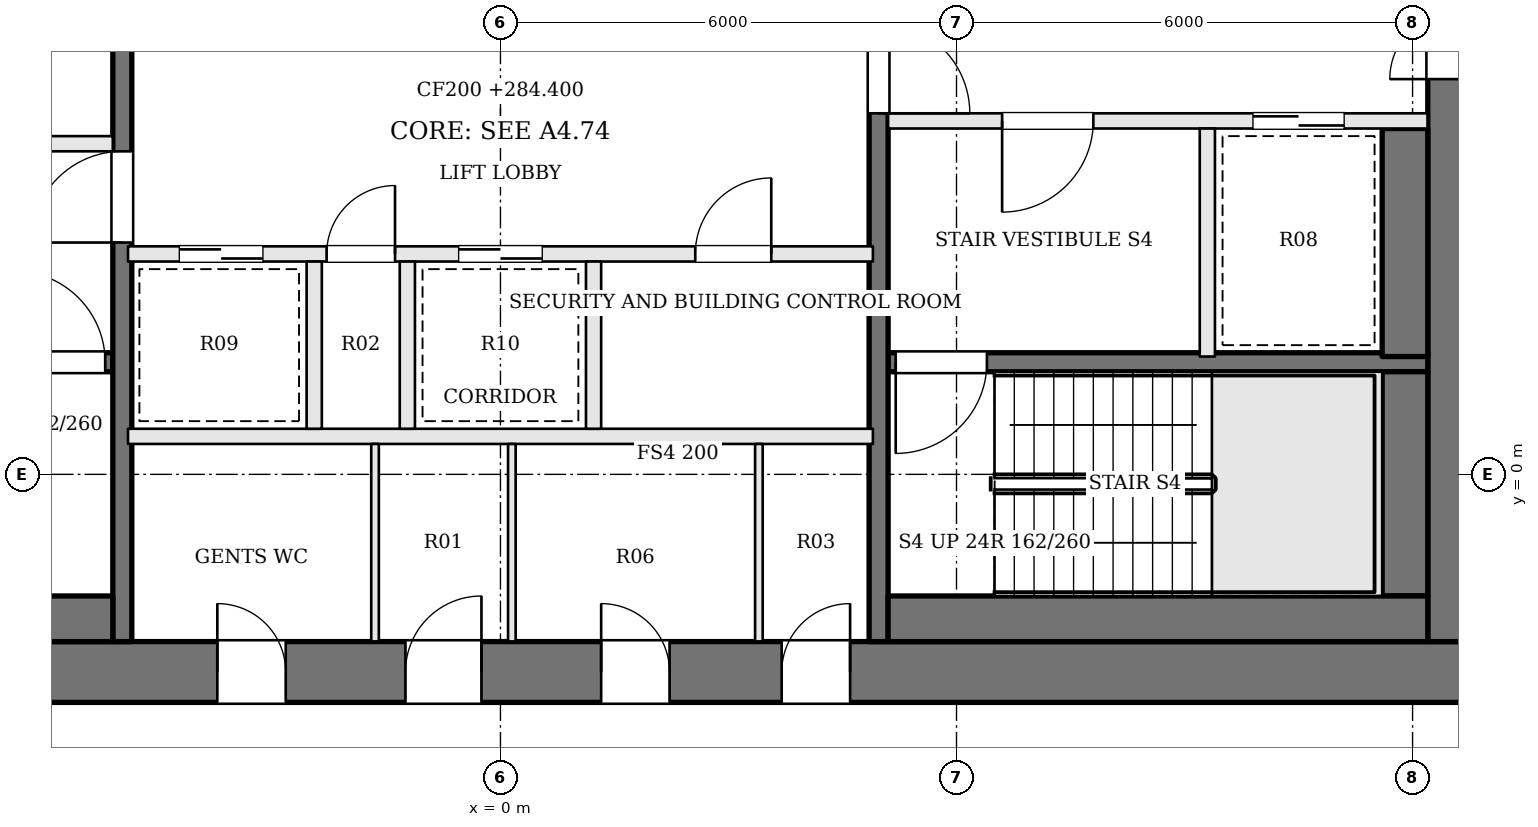
"""IFC4 building model, lengths in metres.
Left out: names, types, materials, properties, quantities, classifications, styles, units other than length and angle.
Written with IfcOpenShell. Run it as: python <this file> out.ifc"""

import sys

from ifc_helpers import new_model, si_unit, direction, frame, frame_2d, origin, place, context, subcontext, project, spatial, rectangle, extrude, element, fill, save


model = new_model("IFC4")
c1 = context("Model", 3, precision=1e-05, world=origin(), true_north=direction((0.0, 1.0)))
c2 = subcontext(c1, "Body", "Model", "MODEL_VIEW")
j1 = project(units=[si_unit("LENGTHUNIT", "METRE"), si_unit("PLANEANGLEUNIT", "RADIAN")], contexts=[c1])
p1 = place(None, origin())
s1 = spatial("IfcSite", under=j1, at=p1, CompositionType="ELEMENT")
p2 = place(p1, origin())
s2 = spatial("IfcBuilding", under=s1, at=p2, CompositionType="ELEMENT")
p3 = place(p2, frame((0.0, 0.0, 284.4)))
s3 = spatial("IfcBuildingStorey", under=s2, at=p3, CompositionType="ELEMENT", Elevation=284.4)
p4 = place(p3, frame((-13.0, -2.6, 0.0), z_axis=(0.0, 0.0, 1.0), x_axis=(1.0, 0.0, 0.0)))
e1 = element("IfcWall", 1, at=p4, inside=s3, PredefinedType="SHEAR", context=c2, shape_type="SweptSolid", body=[
    extrude(rectangle(XDim=26.0, YDim=0.8, at=frame_2d((13.0, 0.0))), origin(), (0.0, 0.0, 1.0), 3.9),
])
p5 = place(p4, frame((9.275, 0.0, 0.0)))
e2 = element("IfcOpeningElement", 2, at=p5, cuts=e1, PredefinedType="OPENING", context=c2, shape_type="SweptSolid", body=[
    extrude(rectangle(XDim=0.9, YDim=2.1, at=frame_2d((0.45, 1.05))), frame((0.0, 0.41, 0.0), z_axis=(0.0, -1.0, 0.0), x_axis=(1.0, 0.0, 0.0)), (0.0, 0.0, 1.0), 0.82),
])
p6 = place(p4, frame((11.75, 0.0, 0.0)))
e3 = element("IfcOpeningElement", 3, at=p6, cuts=e1, PredefinedType="OPENING", context=c2, shape_type="SweptSolid", body=[
    extrude(rectangle(XDim=1.0, YDim=2.1, at=frame_2d((0.5, 1.05))), frame((0.0, 0.41, 0.0), z_axis=(0.0, -1.0, 0.0), x_axis=(1.0, 0.0, 0.0)), (0.0, 0.0, 1.0), 0.82),
])
p7 = place(p4, frame((14.325, 0.0, 0.0)))
e4 = element("IfcOpeningElement", 4, at=p7, cuts=e1, PredefinedType="OPENING", context=c2, shape_type="SweptSolid", body=[
    extrude(rectangle(XDim=0.9, YDim=2.1, at=frame_2d((0.45, 1.05))), frame((0.0, 0.41, 0.0), z_axis=(0.0, -1.0, 0.0), x_axis=(1.0, 0.0, 0.0)), (0.0, 0.0, 1.0), 0.82),
])
p8 = place(p4, frame((16.7, 0.0, 0.0)))
e5 = element("IfcOpeningElement", 5, at=p8, cuts=e1, PredefinedType="OPENING", context=c2, shape_type="SweptSolid", body=[
    extrude(rectangle(XDim=0.9, YDim=2.1, at=frame_2d((0.45, 1.05))), frame((0.0, 0.41, 0.0), z_axis=(0.0, -1.0, 0.0), x_axis=(1.0, 0.0, 0.0)), (0.0, 0.0, 1.0), 0.82),
])
p9 = place(p3, frame((12.6, -2.2, 0.0), z_axis=(0.0, 0.0, 1.0), x_axis=(0.0, 1.0, 0.0)))
e6 = element("IfcWall", 6, at=p9, inside=s3, PredefinedType="SHEAR", context=c2, shape_type="SweptSolid", body=[
    extrude(rectangle(XDim=13.4, YDim=0.8, at=frame_2d((6.7, 0.0))), origin(), (0.0, 0.0, 1.0), 3.9),
])
p10 = place(p9, frame((7.4, 0.0, 0.0)))
e7 = element("IfcOpeningElement", 7, at=p10, cuts=e6, PredefinedType="OPENING", context=c2, shape_type="SweptSolid", body=[
    extrude(rectangle(XDim=1.8, YDim=2.1, at=frame_2d((0.9, 1.05))), frame((0.0, 0.41, 0.0), z_axis=(0.0, -1.0, 0.0), x_axis=(1.0, 0.0, 0.0)), (0.0, 0.0, 1.0), 0.82),
])
p11 = place(p3, frame((-12.2, 1.475, 0.0), z_axis=(0.0, 0.0, 1.0), x_axis=(1.0, 0.0, 0.0)))
e8 = element("IfcWall", 8, at=p11, inside=s3, PredefinedType="SOLIDWALL", context=c2, shape_type="SweptSolid", body=[
    extrude(rectangle(XDim=7.1, YDim=0.25, at=frame_2d((3.55, 0.0))), origin(), (0.0, 0.0, 1.0), 3.7),
])
p12 = place(p11, frame((5.8, 0.0, 0.0)))
e9 = element("IfcOpeningElement", 9, at=p12, cuts=e8, PredefinedType="OPENING", context=c2, shape_type="SweptSolid", body=[
    extrude(rectangle(XDim=1.2, YDim=2.1, at=frame_2d((0.6, 1.05))), frame((0.0, 0.135, 0.0), z_axis=(0.0, -1.0, 0.0), x_axis=(1.0, 0.0, 0.0)), (0.0, 0.0, 1.0), 0.27),
])
p13 = place(p3, frame((-12.2, 4.35, 0.0), z_axis=(0.0, 0.0, 1.0), x_axis=(1.0, 0.0, 0.0)))
e10 = element("IfcWall", 10, at=p13, inside=s3, PredefinedType="SOLIDWALL", context=c2, shape_type="SweptSolid", body=[
    extrude(rectangle(XDim=7.1, YDim=0.2, at=frame_2d((3.55, 0.0))), origin(), (0.0, 0.0, 1.0), 3.7),
])
p14 = place(p13, frame((4.4, 0.0, 0.0)))
e11 = element("IfcOpeningElement", 11, at=p14, cuts=e10, PredefinedType="OPENING", context=c2, shape_type="SweptSolid", body=[
    extrude(rectangle(XDim=1.2, YDim=2.1, at=frame_2d((0.6, 1.05))), frame((0.0, 0.11, 0.0), z_axis=(0.0, -1.0, 0.0), x_axis=(1.0, 0.0, 0.0)), (0.0, 0.0, 1.0), 0.22),
])
p15 = place(p13, frame((1.1, 0.0, 0.0)))
e12 = element("IfcOpeningElement", 12, at=p15, cuts=e10, PredefinedType="OPENING", context=c2, shape_type="SweptSolid", body=[
    extrude(rectangle(XDim=1.2, YDim=2.1, at=frame_2d((0.6, 1.05))), frame((0.0, 0.11, 0.0), z_axis=(0.0, -1.0, 0.0), x_axis=(1.0, 0.0, 0.0)), (0.0, 0.0, 1.0), 0.22),
])
p16 = place(p3, frame((12.2, 4.65, 0.0), z_axis=(0.0, 0.0, 1.0), x_axis=(-1.0, 0.0, 0.0)))
e13 = element("IfcWall", 13, at=p16, inside=s3, PredefinedType="SOLIDWALL", context=c2, shape_type="SweptSolid", body=[
    extrude(rectangle(XDim=7.1, YDim=0.2, at=frame_2d((3.55, 0.0))), origin(), (0.0, 0.0, 1.0), 3.7),
])
p17 = place(p16, frame((4.4, 0.0, 0.0)))
e14 = element("IfcOpeningElement", 14, at=p17, cuts=e13, PredefinedType="OPENING", context=c2, shape_type="SweptSolid", body=[
    extrude(rectangle(XDim=1.2, YDim=2.1, at=frame_2d((0.6, 1.05))), frame((0.0, 0.11, 0.0), z_axis=(0.0, -1.0, 0.0), x_axis=(1.0, 0.0, 0.0)), (0.0, 0.0, 1.0), 0.22),
])
p18 = place(p16, frame((1.1, 0.0, 0.0)))
e15 = element("IfcOpeningElement", 15, at=p18, cuts=e13, PredefinedType="OPENING", context=c2, shape_type="SweptSolid", body=[
    extrude(rectangle(XDim=1.2, YDim=2.1, at=frame_2d((0.6, 1.05))), frame((0.0, 0.11, 0.0), z_axis=(0.0, -1.0, 0.0), x_axis=(1.0, 0.0, 0.0)), (0.0, 0.0, 1.0), 0.22),
])
p19 = place(p3, frame((12.2, 1.475, 0.0), z_axis=(0.0, 0.0, 1.0), x_axis=(-1.0, 0.0, 0.0)))
e16 = element("IfcWall", 16, at=p19, inside=s3, PredefinedType="SOLIDWALL", context=c2, shape_type="SweptSolid", body=[
    extrude(rectangle(XDim=7.1, YDim=0.25, at=frame_2d((3.55, 0.0))), origin(), (0.0, 0.0, 1.0), 3.7),
])
p20 = place(p19, frame((5.8, 0.0, 0.0)))
e17 = element("IfcOpeningElement", 17, at=p20, cuts=e16, PredefinedType="OPENING", context=c2, shape_type="SweptSolid", body=[
    extrude(rectangle(XDim=1.2, YDim=2.1, at=frame_2d((0.6, 1.05))), frame((0.0, 0.135, 0.0), z_axis=(0.0, -1.0, 0.0), x_axis=(1.0, 0.0, 0.0)), (0.0, 0.0, 1.0), 0.27),
])
p21 = place(p3, frame((9.3, 4.55, 0.0), z_axis=(0.0, 0.0, 1.0), x_axis=(0.0, -1.0, 0.0)))
e18 = element("IfcWall", 18, at=p21, inside=s3, PredefinedType="SOLIDWALL", context=c2, shape_type="SweptSolid", body=[
    extrude(rectangle(XDim=3.0, YDim=0.2, at=frame_2d((1.5, 0.0))), origin(), (0.0, 0.0, 1.0), 3.7),
])
p22 = place(p3, frame((-4.975, -2.2, 0.0), z_axis=(0.0, 0.0, 1.0), x_axis=(0.0, 1.0, 0.0)))
e19 = element("IfcWall", 19, at=p22, inside=s3, PredefinedType="SOLIDWALL", context=c2, shape_type="SweptSolid", body=[
    extrude(rectangle(XDim=13.4, YDim=0.25, at=frame_2d((6.7, 0.0))), origin(), (0.0, 0.0, 1.0), 3.7),
])
p23 = place(p22, frame((5.25, 0.0, 0.0)))
e20 = element("IfcOpeningElement", 20, at=p23, cuts=e19, PredefinedType="OPENING", context=c2, shape_type="SweptSolid", body=[
    extrude(rectangle(XDim=1.2, YDim=2.1, at=frame_2d((0.6, 1.05))), frame((0.0, 0.135, 0.0), z_axis=(0.0, -1.0, 0.0), x_axis=(1.0, 0.0, 0.0)), (0.0, 0.0, 1.0), 0.27),
])
p24 = place(p3, frame((4.975, 11.2, 0.0), z_axis=(0.0, 0.0, 1.0), x_axis=(0.0, -1.0, 0.0)))
e21 = element("IfcWall", 21, at=p24, inside=s3, PredefinedType="SOLIDWALL", context=c2, shape_type="SweptSolid", body=[
    extrude(rectangle(XDim=13.4, YDim=0.25, at=frame_2d((6.7, 0.0))), origin(), (0.0, 0.0, 1.0), 3.7),
])
p25 = place(p24, frame((5.25, 0.0, 0.0)))
e22 = element("IfcOpeningElement", 22, at=p25, cuts=e21, PredefinedType="OPENING", context=c2, shape_type="SweptSolid", body=[
    extrude(rectangle(XDim=1.2, YDim=2.1, at=frame_2d((0.6, 1.05))), frame((0.0, 0.135, 0.0), z_axis=(0.0, -1.0, 0.0), x_axis=(1.0, 0.0, 0.0)), (0.0, 0.0, 1.0), 0.27),
])
p26 = place(p3, frame((-12.2, -1.9, 0.0), z_axis=(0.0, 0.0, 1.0), x_axis=(1.0, 0.0, 0.0)))
e23 = element("IfcWall", 23, at=p26, inside=s3, PredefinedType="SOLIDWALL", context=c2, shape_type="SweptSolid", body=[
    extrude(rectangle(XDim=7.1, YDim=0.6, at=frame_2d((3.55, 0.0))), origin(), (0.0, 0.0, 1.0), 3.7),
])
p27 = place(p3, frame((11.9, 4.55, 0.0), z_axis=(0.0, 0.0, 1.0), x_axis=(0.0, -1.0, 0.0)))
e24 = element("IfcWall", 24, at=p27, inside=s3, PredefinedType="SOLIDWALL", context=c2, shape_type="SweptSolid", body=[
    extrude(rectangle(XDim=3.0, YDim=0.6, at=frame_2d((1.5, 0.0))), origin(), (0.0, 0.0, 1.0), 3.7),
])
p28 = place(p3, frame((11.9, 1.35, 0.0), z_axis=(0.0, 0.0, 1.0), x_axis=(0.0, -1.0, 0.0)))
e25 = element("IfcWall", 25, at=p28, inside=s3, PredefinedType="SOLIDWALL", context=c2, shape_type="SweptSolid", body=[
    extrude(rectangle(XDim=2.95, YDim=0.6, at=frame_2d((1.475, 0.0))), origin(), (0.0, 0.0, 1.0), 3.7),
])
p29 = place(p3, frame((12.2, -1.9, 0.0), z_axis=(0.0, 0.0, 1.0), x_axis=(-1.0, 0.0, 0.0)))
e26 = element("IfcWall", 26, at=p29, inside=s3, PredefinedType="SOLIDWALL", context=c2, shape_type="SweptSolid", body=[
    extrude(rectangle(XDim=7.1, YDim=0.6, at=frame_2d((3.55, 0.0))), origin(), (0.0, 0.0, 1.0), 3.7),
])
p30 = place(p3, frame((-4.9, 0.5, 0.0), z_axis=(0.0, 0.0, 1.0), x_axis=(1.0, 0.0, 0.0)))
e27 = element("IfcWall", 27, at=p30, inside=s3, PredefinedType="SOLIDWALL", context=c2, shape_type="SweptSolid", body=[
    extrude(rectangle(XDim=9.8, YDim=0.2, at=frame_2d((4.9, 0.0))), origin(), (0.0, 0.0, 1.0), 3.7),
])
p31 = place(p3, frame((-4.9, 2.9, 0.0), z_axis=(0.0, 0.0, 1.0), x_axis=(1.0, 0.0, 0.0)))
e28 = element("IfcWall", 28, at=p31, inside=s3, PredefinedType="SOLIDWALL", context=c2, shape_type="SweptSolid", body=[
    extrude(rectangle(XDim=9.8, YDim=0.2, at=frame_2d((4.9, 0.0))), origin(), (0.0, 0.0, 1.0), 3.7),
])
p32 = place(p31, frame((0.675, 0.0, 0.0)))
e29 = element("IfcOpeningElement", 29, at=p32, cuts=e28, PredefinedType="OPENING", context=c2, shape_type="SweptSolid", body=[
    extrude(rectangle(XDim=1.1, YDim=2.1, at=frame_2d((0.55, 1.05))), frame((0.0, 0.11, 0.0), z_axis=(0.0, -1.0, 0.0), x_axis=(1.0, 0.0, 0.0)), (0.0, 0.0, 1.0), 0.22),
])
p33 = place(p31, frame((2.613, 0.0, 0.0)))
e30 = element("IfcOpeningElement", 30, at=p33, cuts=e28, PredefinedType="OPENING", context=c2, shape_type="SweptSolid", body=[
    extrude(rectangle(XDim=0.9, YDim=2.1, at=frame_2d((0.45, 1.05))), frame((0.0, 0.11, 0.0), z_axis=(0.0, -1.0, 0.0), x_axis=(1.0, 0.0, 0.0)), (0.0, 0.0, 1.0), 0.22),
])
p34 = place(p31, frame((4.35, 0.0, 0.0)))
e31 = element("IfcOpeningElement", 31, at=p34, cuts=e28, PredefinedType="OPENING", context=c2, shape_type="SweptSolid", body=[
    extrude(rectangle(XDim=1.1, YDim=2.1, at=frame_2d((0.55, 1.05))), frame((0.0, 0.11, 0.0), z_axis=(0.0, -1.0, 0.0), x_axis=(1.0, 0.0, 0.0)), (0.0, 0.0, 1.0), 0.22),
])
p35 = place(p31, frame((7.463, 0.0, 0.0)))
e32 = element("IfcOpeningElement", 32, at=p35, cuts=e28, PredefinedType="OPENING", context=c2, shape_type="SweptSolid", body=[
    extrude(rectangle(XDim=1.0, YDim=2.1, at=frame_2d((0.5, 1.05))), frame((0.0, 0.11, 0.0), z_axis=(0.0, -1.0, 0.0), x_axis=(1.0, 0.0, 0.0)), (0.0, 0.0, 1.0), 0.22),
])
for number, where, z_axis, x_axis in (
    (33, (-2.45, 0.6, 0.0), (0.0, 0.0, 1.0), (0.0, 1.0, 0.0)),
    (34, (-1.225, 0.6, 0.0), (0.0, 0.0, 1.0), (0.0, 1.0, 0.0)),
    (35, (1.225, 0.6, 0.0), (0.0, 0.0, 1.0), (0.0, 1.0, 0.0)),
):
    element("IfcWall", number, at=place(p3, frame(where, z_axis=z_axis, x_axis=x_axis)), inside=s3, PredefinedType="SOLIDWALL", context=c2, shape_type="SweptSolid", body=[
        extrude(rectangle(XDim=2.2, YDim=0.2, at=frame_2d((1.1, 0.0))), origin(), (0.0, 0.0, 1.0), 3.7),
    ])
for number, where, z_axis, x_axis in (
    (36, (-1.65, -2.2, 0.0), (0.0, 0.0, 1.0), (0.0, 1.0, 0.0)),
    (37, (0.15, -2.2, 0.0), (0.0, 0.0, 1.0), (0.0, 1.0, 0.0)),
    (38, (3.4, -2.2, 0.0), (0.0, 0.0, 1.0), (0.0, 1.0, 0.0)),
):
    element("IfcWall", number, at=place(p3, frame(where, z_axis=z_axis, x_axis=x_axis)), inside=s3, PredefinedType="PARTITIONING", context=c2, shape_type="SweptSolid", body=[
        extrude(rectangle(XDim=2.6, YDim=0.1, at=frame_2d((1.3, 0.0))), origin(), (0.0, 0.0, 1.0), 3.7),
    ])
p36 = place(p10, origin())
e39 = element("IfcDoor", 39, at=p36, inside=s3, OperationType="DOUBLE_DOOR_SINGLE_SWING", PredefinedType="DOOR", context=c2, shape_type="SweptSolid", body=[
    extrude(rectangle(XDim=1.8, YDim=2.1, at=frame_2d((0.9, 1.05))), frame((0.0, 0.025, 0.0), z_axis=(0.0, -1.0, 0.0), x_axis=(1.0, 0.0, 0.0)), (0.0, 0.0, 1.0), 0.05),
])
fill(e7, e39)
p37 = place(p23, origin())
e40 = element("IfcDoor", 40, at=p37, inside=s3, OperationType="SINGLE_SWING_LEFT", PredefinedType="DOOR", context=c2, shape_type="SweptSolid", body=[
    extrude(rectangle(XDim=1.2, YDim=2.1, at=frame_2d((0.6, 1.05))), frame((0.0, 0.025, 0.0), z_axis=(0.0, -1.0, 0.0), x_axis=(1.0, 0.0, 0.0)), (0.0, 0.0, 1.0), 0.05),
])
fill(e20, e40)
p38 = place(p25, origin())
e41 = element("IfcDoor", 41, at=p38, inside=s3, OperationType="SINGLE_SWING_RIGHT", PredefinedType="DOOR", context=c2, shape_type="SweptSolid", body=[
    extrude(rectangle(XDim=1.2, YDim=2.1, at=frame_2d((0.6, 1.05))), frame((0.0, 0.025, 0.0), z_axis=(0.0, -1.0, 0.0), x_axis=(1.0, 0.0, 0.0)), (0.0, 0.0, 1.0), 0.05),
])
fill(e22, e41)
p39 = place(p17, origin())
e42 = element("IfcDoor", 42, at=p39, inside=s3, OperationType="SINGLE_SWING_RIGHT", PredefinedType="DOOR", context=c2, shape_type="SweptSolid", body=[
    extrude(rectangle(XDim=1.2, YDim=2.1, at=frame_2d((0.6, 1.05))), frame((0.0, 0.025, 0.0), z_axis=(0.0, -1.0, 0.0), x_axis=(1.0, 0.0, 0.0)), (0.0, 0.0, 1.0), 0.05),
])
fill(e14, e42)
p40 = place(p12, origin())
e43 = element("IfcDoor", 43, at=p40, inside=s3, OperationType="SINGLE_SWING_LEFT", PredefinedType="DOOR", context=c2, shape_type="SweptSolid", body=[
    extrude(rectangle(XDim=1.2, YDim=2.1, at=frame_2d((0.6, 1.05))), frame((0.0, 0.025, 0.0), z_axis=(0.0, -1.0, 0.0), x_axis=(1.0, 0.0, 0.0)), (0.0, 0.0, 1.0), 0.05),
])
fill(e9, e43)
p41 = place(p20, origin())
e44 = element("IfcDoor", 44, at=p41, inside=s3, OperationType="SINGLE_SWING_RIGHT", PredefinedType="DOOR", context=c2, shape_type="SweptSolid", body=[
    extrude(rectangle(XDim=1.2, YDim=2.1, at=frame_2d((0.6, 1.05))), frame((0.0, 0.025, 0.0), z_axis=(0.0, -1.0, 0.0), x_axis=(1.0, 0.0, 0.0)), (0.0, 0.0, 1.0), 0.05),
])
fill(e17, e44)
p42 = place(p18, origin())
e45 = element("IfcDoor", 45, at=p42, inside=s3, OperationType="SLIDING_TO_RIGHT", PredefinedType="DOOR", context=c2, shape_type="SweptSolid", body=[
    extrude(rectangle(XDim=1.2, YDim=2.1, at=frame_2d((0.6, 1.05))), frame((0.0, 0.025, 0.0), z_axis=(0.0, -1.0, 0.0), x_axis=(1.0, 0.0, 0.0)), (0.0, 0.0, 1.0), 0.05),
])
fill(e15, e45)
p43 = place(p32, origin())
e46 = element("IfcDoor", 46, at=p43, inside=s3, OperationType="SLIDING_TO_RIGHT", PredefinedType="DOOR", context=c2, shape_type="SweptSolid", body=[
    extrude(rectangle(XDim=1.1, YDim=2.1, at=frame_2d((0.55, 1.05))), frame((0.0, 0.025, 0.0), z_axis=(0.0, -1.0, 0.0), x_axis=(1.0, 0.0, 0.0)), (0.0, 0.0, 1.0), 0.05),
])
fill(e29, e46)
p44 = place(p33, origin())
e47 = element("IfcDoor", 47, at=p44, inside=s3, OperationType="SINGLE_SWING_RIGHT", PredefinedType="DOOR", context=c2, shape_type="SweptSolid", body=[
    extrude(rectangle(XDim=0.9, YDim=2.1, at=frame_2d((0.45, 1.05))), frame((0.0, 0.025, 0.0), z_axis=(0.0, -1.0, 0.0), x_axis=(1.0, 0.0, 0.0)), (0.0, 0.0, 1.0), 0.05),
])
fill(e30, e47)
p45 = place(p34, origin())
e48 = element("IfcDoor", 48, at=p45, inside=s3, OperationType="SLIDING_TO_LEFT", PredefinedType="DOOR", context=c2, shape_type="SweptSolid", body=[
    extrude(rectangle(XDim=1.1, YDim=2.1, at=frame_2d((0.55, 1.05))), frame((0.0, 0.025, 0.0), z_axis=(0.0, -1.0, 0.0), x_axis=(1.0, 0.0, 0.0)), (0.0, 0.0, 1.0), 0.05),
])
fill(e31, e48)
p46 = place(p35, origin())
e49 = element("IfcDoor", 49, at=p46, inside=s3, OperationType="SINGLE_SWING_RIGHT", PredefinedType="DOOR", context=c2, shape_type="SweptSolid", body=[
    extrude(rectangle(XDim=1.0, YDim=2.1, at=frame_2d((0.5, 1.05))), frame((0.0, 0.025, 0.0), z_axis=(0.0, -1.0, 0.0), x_axis=(1.0, 0.0, 0.0)), (0.0, 0.0, 1.0), 0.05),
])
fill(e32, e49)
p47 = place(p5, origin())
e50 = element("IfcDoor", 50, at=p47, inside=s3, OperationType="SINGLE_SWING_LEFT", PredefinedType="DOOR", context=c2, shape_type="SweptSolid", body=[
    extrude(rectangle(XDim=0.9, YDim=2.1, at=frame_2d((0.45, 1.05))), frame((0.0, 0.025, 0.0), z_axis=(0.0, -1.0, 0.0), x_axis=(1.0, 0.0, 0.0)), (0.0, 0.0, 1.0), 0.05),
])
fill(e2, e50)
p48 = place(p6, origin())
e51 = element("IfcDoor", 51, at=p48, inside=s3, OperationType="SINGLE_SWING_RIGHT", PredefinedType="DOOR", context=c2, shape_type="SweptSolid", body=[
    extrude(rectangle(XDim=1.0, YDim=2.1, at=frame_2d((0.5, 1.05))), frame((0.0, 0.025, 0.0), z_axis=(0.0, -1.0, 0.0), x_axis=(1.0, 0.0, 0.0)), (0.0, 0.0, 1.0), 0.05),
])
fill(e3, e51)
p49 = place(p7, origin())
e52 = element("IfcDoor", 52, at=p49, inside=s3, OperationType="SINGLE_SWING_LEFT", PredefinedType="DOOR", context=c2, shape_type="SweptSolid", body=[
    extrude(rectangle(XDim=0.9, YDim=2.1, at=frame_2d((0.45, 1.05))), frame((0.0, 0.025, 0.0), z_axis=(0.0, -1.0, 0.0), x_axis=(1.0, 0.0, 0.0)), (0.0, 0.0, 1.0), 0.05),
])
fill(e4, e52)
p50 = place(p8, origin())
e53 = element("IfcDoor", 53, at=p50, inside=s3, OperationType="SINGLE_SWING_RIGHT", PredefinedType="DOOR", context=c2, shape_type="SweptSolid", body=[
    extrude(rectangle(XDim=0.9, YDim=2.1, at=frame_2d((0.45, 1.05))), frame((0.0, 0.025, 0.0), z_axis=(0.0, -1.0, 0.0), x_axis=(1.0, 0.0, 0.0)), (0.0, 0.0, 1.0), 0.05),
])
fill(e5, e53)
save(model, sys.argv[1])
